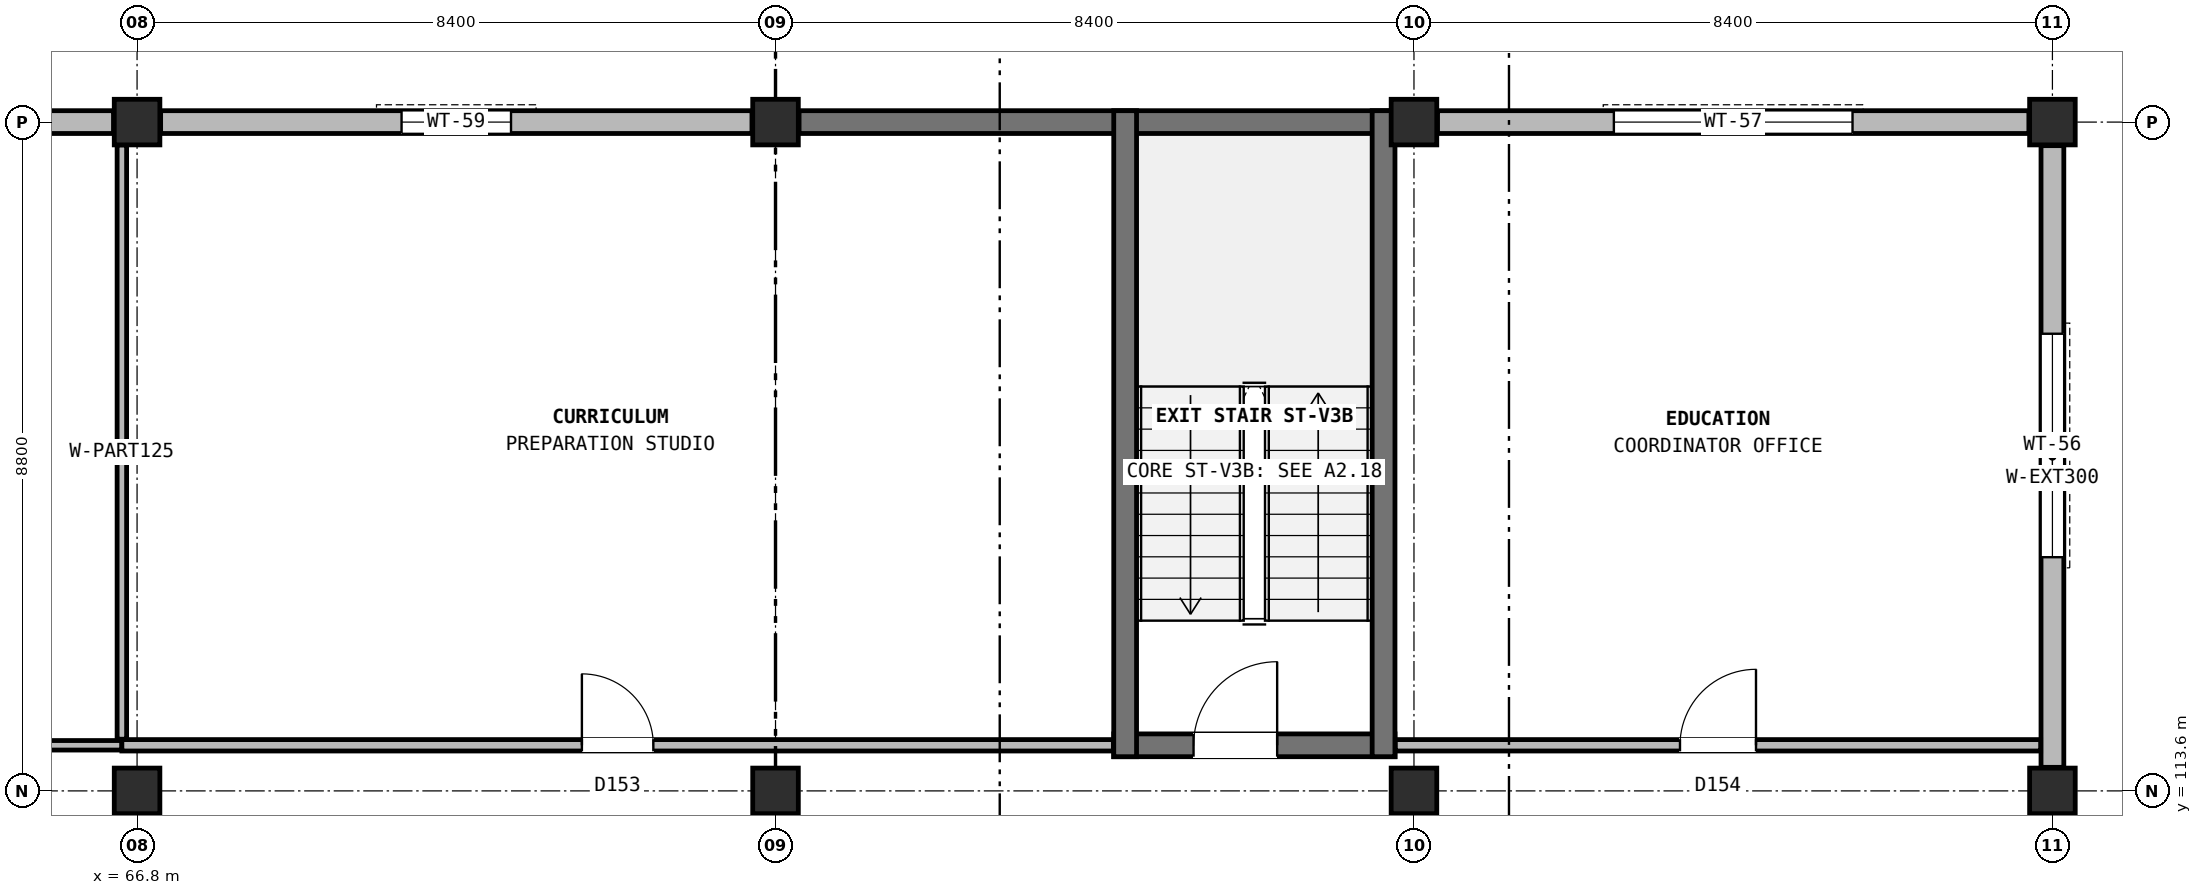
"""IFC4 building model, lengths in metres.
Left out: names, types, materials, properties, quantities, classifications, styles, units other than length and angle.
Written with IfcOpenShell. Run it as: python <this file> out.ifc"""

import sys

from ifc_helpers import new_model, si_unit, direction, frame, frame_2d, origin, origin_2d, place, context, subcontext, project, spatial, rectangle, extrude, element, fill, save


model = new_model("IFC4")
c1 = context("Model", 3, precision=1e-05, world=origin(), true_north=direction((0.0, 1.0)))
c2 = subcontext(c1, "Body", "Model", "MODEL_VIEW")
j1 = project(units=[si_unit("LENGTHUNIT", "METRE"), si_unit("PLANEANGLEUNIT", "RADIAN")], contexts=[c1])
p1 = place(None, origin())
s1 = spatial("IfcSite", under=j1, at=p1, CompositionType="ELEMENT")
p2 = place(p1, origin())
s2 = spatial("IfcBuilding", under=s1, at=p2, CompositionType="ELEMENT")
p3 = place(p2, frame((0.0, 0.0, 4.8)))
s3 = spatial("IfcBuildingStorey", under=s2, at=p3, CompositionType="ELEMENT", Elevation=4.8)
for number, where, z_axis, x_axis in (
    (1, (66.8, 113.6, 0.0), (0.0, 0.0, 1.0), (1.0, 0.0, 0.0)),
    (2, (66.8, 122.4, 0.0), (0.0, 0.0, 1.0), (1.0, 0.0, 0.0)),
    (3, (75.2, 113.6, 0.0), (0.0, 0.0, 1.0), (1.0, 0.0, 0.0)),
    (4, (75.2, 122.4, 0.0), (0.0, 0.0, 1.0), (1.0, 0.0, 0.0)),
    (5, (83.6, 113.6, 0.0), (0.0, 0.0, 1.0), (1.0, 0.0, 0.0)),
    (6, (83.6, 122.4, 0.0), (0.0, 0.0, 1.0), (1.0, 0.0, 0.0)),
    (7, (92.0, 113.6, 0.0), (0.0, 0.0, 1.0), (1.0, 0.0, 0.0)),
    (8, (92.0, 122.4, 0.0), (0.0, 0.0, 1.0), (1.0, 0.0, 0.0)),
):
    element("IfcColumn", number, at=place(p3, frame(where, z_axis=z_axis, x_axis=x_axis)), inside=s3, PredefinedType="COLUMN", context=c2, shape_type="SweptSolid", body=[
        extrude(rectangle(XDim=0.6, YDim=0.6, at=origin_2d()), origin(), (0.0, 0.0, 1.0), 4.2),
    ])
p4 = place(p3, frame((92.0, 105.11, 0.0), z_axis=(0.0, 0.0, 1.0), x_axis=(0.0, 1.0, 0.0)))
e9 = element("IfcWall", 9, at=p4, inside=s3, PredefinedType="SOLIDWALL", context=c2, shape_type="SweptSolid", body=[
    extrude(rectangle(XDim=8.18, YDim=0.3, at=frame_2d((4.09, 0.0))), origin(), (0.0, 0.0, 1.0), 3.45),
])
p5 = place(p4, frame((1.575, 0.0, 0.9)))
e10 = element("IfcOpeningElement", 10, at=p5, cuts=e9, PredefinedType="OPENING", context=c2, shape_type="SweptSolid", body=[
    extrude(rectangle(XDim=2.74, YDim=2.2, at=frame_2d((1.37, 1.1))), frame((0.0, 0.16, 0.0), z_axis=(0.0, -1.0, 0.0), x_axis=(1.0, 0.0, 0.0)), (0.0, 0.0, 1.0), 0.32),
])
p6 = place(p3, frame((92.0, 113.91, 0.0), z_axis=(0.0, 0.0, 1.0), x_axis=(0.0, 1.0, 0.0)))
e11 = element("IfcWall", 11, at=p6, inside=s3, PredefinedType="SOLIDWALL", context=c2, shape_type="SweptSolid", body=[
    extrude(rectangle(XDim=8.18, YDim=0.3, at=frame_2d((4.09, 0.0))), origin(), (0.0, 0.0, 1.0), 3.45),
])
p7 = place(p6, frame((2.765, 0.0, 0.9)))
e12 = element("IfcOpeningElement", 12, at=p7, cuts=e11, PredefinedType="OPENING", context=c2, shape_type="SweptSolid", body=[
    extrude(rectangle(XDim=2.94, YDim=2.22, at=frame_2d((1.47, 1.11))), frame((0.0, 0.16, 0.0), z_axis=(0.0, -1.0, 0.0), x_axis=(1.0, 0.0, 0.0)), (0.0, 0.0, 1.0), 0.32),
])
p8 = place(p3, frame((91.69, 122.4, 0.0), z_axis=(0.0, 0.0, 1.0), x_axis=(-1.0, 0.0, 0.0)))
e13 = element("IfcWall", 13, at=p8, inside=s3, PredefinedType="SOLIDWALL", context=c2, shape_type="SweptSolid", body=[
    extrude(rectangle(XDim=7.78, YDim=0.3, at=frame_2d((3.89, 0.0))), origin(), (0.0, 0.0, 1.0), 3.45),
])
p9 = place(p8, frame((2.32, 0.0, 0.9)))
e14 = element("IfcOpeningElement", 14, at=p9, cuts=e13, PredefinedType="OPENING", context=c2, shape_type="SweptSolid", body=[
    extrude(rectangle(XDim=3.14, YDim=2.24, at=frame_2d((1.57, 1.12))), frame((0.0, 0.16, 0.0), z_axis=(0.0, -1.0, 0.0), x_axis=(1.0, 0.0, 0.0)), (0.0, 0.0, 1.0), 0.32),
])
p10 = place(p3, frame((83.29, 122.4, 0.0), z_axis=(0.0, 0.0, 1.0), x_axis=(-1.0, 0.0, 0.0)))
e15 = element("IfcWall", 15, at=p10, inside=s3, PredefinedType="SHEAR", context=c2, shape_type="SweptSolid", body=[
    extrude(rectangle(XDim=7.78, YDim=0.3, at=frame_2d((3.89, 0.0))), origin(), (0.0, 0.0, 1.0), 3.45),
])
p11 = place(p3, frame((74.89, 122.4, 0.0), z_axis=(0.0, 0.0, 1.0), x_axis=(-1.0, 0.0, 0.0)))
e16 = element("IfcWall", 16, at=p11, inside=s3, PredefinedType="SOLIDWALL", context=c2, shape_type="SweptSolid", body=[
    extrude(rectangle(XDim=7.78, YDim=0.3, at=frame_2d((3.89, 0.0))), origin(), (0.0, 0.0, 1.0), 3.45),
])
p12 = place(p11, frame((3.17, 0.0, 0.9)))
e17 = element("IfcOpeningElement", 17, at=p12, cuts=e16, PredefinedType="OPENING", context=c2, shape_type="SweptSolid", body=[
    extrude(rectangle(XDim=1.44, YDim=2.3, at=frame_2d((0.72, 1.15))), frame((0.0, 0.16, 0.0), z_axis=(0.0, -1.0, 0.0), x_axis=(1.0, 0.0, 0.0)), (0.0, 0.0, 1.0), 0.32),
])
p13 = place(p3, frame((66.49, 122.4, 0.0), z_axis=(0.0, 0.0, 1.0), x_axis=(-1.0, 0.0, 0.0)))
e18 = element("IfcWall", 18, at=p13, inside=s3, PredefinedType="SOLIDWALL", context=c2, shape_type="SweptSolid", body=[
    extrude(rectangle(XDim=7.78, YDim=0.3, at=frame_2d((3.89, 0.0))), origin(), (0.0, 0.0, 1.0), 3.45),
])
p14 = place(p13, frame((2.97, 0.0, 0.9)))
e19 = element("IfcOpeningElement", 19, at=p14, cuts=e18, PredefinedType="OPENING", context=c2, shape_type="SweptSolid", body=[
    extrude(rectangle(XDim=1.84, YDim=2.34, at=frame_2d((0.92, 1.17))), frame((0.0, 0.16, 0.0), z_axis=(0.0, -1.0, 0.0), x_axis=(1.0, 0.0, 0.0)), (0.0, 0.0, 1.0), 0.32),
])
p15 = place(p3, frame((79.65, 114.2, 0.0), z_axis=(0.0, 0.0, 1.0), x_axis=(1.0, 0.0, 0.0)))
e20 = element("IfcWall", 20, at=p15, inside=s3, PredefinedType="SHEAR", context=c2, shape_type="SweptSolid", body=[
    extrude(rectangle(XDim=3.7, YDim=0.3, at=frame_2d((1.85, 0.0))), origin(), (0.0, 0.0, 1.0), 4.2),
])
p16 = place(p15, frame((1.05, 0.0, 0.0)))
e21 = element("IfcOpeningElement", 21, at=p16, cuts=e20, PredefinedType="OPENING", context=c2, shape_type="SweptSolid", body=[
    extrude(rectangle(XDim=1.1, YDim=2.2, at=frame_2d((0.55, 1.1))), frame((0.0, 0.16, 0.0), z_axis=(0.0, -1.0, 0.0), x_axis=(1.0, 0.0, 0.0)), (0.0, 0.0, 1.0), 0.32),
])
for number, where, z_axis, x_axis in (
    (22, (79.8, 114.05, 0.0), (0.0, 0.0, 1.0), (0.0, 1.0, 0.0)),
    (23, (83.2, 114.05, 0.0), (0.0, 0.0, 1.0), (0.0, 1.0, 0.0)),
):
    element("IfcWall", number, at=place(p3, frame(where, z_axis=z_axis, x_axis=x_axis)), inside=s3, PredefinedType="SHEAR", context=c2, shape_type="SweptSolid", body=[
        extrude(rectangle(XDim=8.5, YDim=0.3, at=frame_2d((4.25, 0.0))), origin(), (0.0, 0.0, 1.0), 4.2),
    ])
p17 = place(p3, frame((58.2, 114.2, 0.0), z_axis=(0.0, 0.0, 1.0), x_axis=(1.0, 0.0, 0.0)))
e24 = element("IfcWall", 24, at=p17, inside=s3, PredefinedType="PARTITIONING", context=c2, shape_type="SweptSolid", body=[
    extrude(rectangle(XDim=8.4, YDim=0.125, at=frame_2d((4.2, 0.0))), origin(), (0.0, 0.0, 1.0), 3.865),
])
p18 = place(p17, frame((3.71, 0.0, 0.0)))
e25 = element("IfcOpeningElement", 25, at=p18, cuts=e24, PredefinedType="OPENING", context=c2, shape_type="SweptSolid", body=[
    extrude(rectangle(XDim=0.98, YDim=2.1, at=frame_2d((0.49, 1.05))), frame((0.0, 0.073, 0.0), z_axis=(0.0, -1.0, 0.0), x_axis=(1.0, 0.0, 0.0)), (0.0, 0.0, 1.0), 0.145),
])
p19 = place(p3, frame((66.6, 114.2, 0.0), z_axis=(0.0, 0.0, 1.0), x_axis=(1.0, 0.0, 0.0)))
e26 = element("IfcWall", 26, at=p19, inside=s3, PredefinedType="PARTITIONING", context=c2, shape_type="SweptSolid", body=[
    extrude(rectangle(XDim=13.045, YDim=0.15, at=frame_2d((6.522, 0.0))), origin(), (0.0, 0.0, 1.0), 3.865),
])
p20 = place(p19, frame((6.052, 0.0, 0.0)))
e27 = element("IfcOpeningElement", 27, at=p20, cuts=e26, PredefinedType="OPENING", context=c2, shape_type="SweptSolid", body=[
    extrude(rectangle(XDim=0.94, YDim=2.12, at=frame_2d((0.47, 1.06))), frame((0.0, 0.085, 0.0), z_axis=(0.0, -1.0, 0.0), x_axis=(1.0, 0.0, 0.0)), (0.0, 0.0, 1.0), 0.17),
])
p21 = place(p3, frame((83.355, 114.2, 0.0), z_axis=(0.0, 0.0, 1.0), x_axis=(1.0, 0.0, 0.0)))
e28 = element("IfcWall", 28, at=p21, inside=s3, PredefinedType="PARTITIONING", context=c2, shape_type="SweptSolid", body=[
    extrude(rectangle(XDim=8.49, YDim=0.15, at=frame_2d((4.245, 0.0))), origin(), (0.0, 0.0, 1.0), 3.865),
])
p22 = place(p21, frame((3.745, 0.0, 0.0)))
e29 = element("IfcOpeningElement", 29, at=p22, cuts=e28, PredefinedType="OPENING", context=c2, shape_type="SweptSolid", body=[
    extrude(rectangle(XDim=1.0, YDim=2.16, at=frame_2d((0.5, 1.08))), frame((0.0, 0.085, 0.0), z_axis=(0.0, -1.0, 0.0), x_axis=(1.0, 0.0, 0.0)), (0.0, 0.0, 1.0), 0.17),
])
p23 = place(p3, frame((66.6, 114.28, 0.0), z_axis=(0.0, 0.0, 1.0), x_axis=(0.0, 1.0, 0.0)))
e30 = element("IfcWall", 30, at=p23, inside=s3, PredefinedType="PARTITIONING", context=c2, shape_type="SweptSolid", body=[
    extrude(rectangle(XDim=7.82, YDim=0.125, at=frame_2d((3.91, 0.0))), origin(), (0.0, 0.0, 1.0), 3.445),
])
p24 = place(p7, origin())
e31 = element("IfcWindow", 31, at=p24, inside=s3, PartitioningType="SINGLE_PANEL", PredefinedType="WINDOW", context=c2, shape_type="SweptSolid", body=[
    extrude(rectangle(XDim=2.94, YDim=2.22, at=frame_2d((1.47, 1.11))), frame((0.0, 0.03, 0.0), z_axis=(0.0, -1.0, 0.0), x_axis=(1.0, 0.0, 0.0)), (0.0, 0.0, 1.0), 0.06),
])
fill(e12, e31)
p25 = place(p9, origin())
e32 = element("IfcWindow", 32, at=p25, inside=s3, PartitioningType="SINGLE_PANEL", PredefinedType="WINDOW", context=c2, shape_type="SweptSolid", body=[
    extrude(rectangle(XDim=3.14, YDim=2.24, at=frame_2d((1.57, 1.12))), frame((0.0, 0.03, 0.0), z_axis=(0.0, -1.0, 0.0), x_axis=(1.0, 0.0, 0.0)), (0.0, 0.0, 1.0), 0.06),
])
fill(e14, e32)
p26 = place(p12, origin())
e33 = element("IfcWindow", 33, at=p26, inside=s3, PartitioningType="SINGLE_PANEL", PredefinedType="WINDOW", context=c2, shape_type="SweptSolid", body=[
    extrude(rectangle(XDim=1.44, YDim=2.3, at=frame_2d((0.72, 1.15))), frame((0.0, 0.03, 0.0), z_axis=(0.0, -1.0, 0.0), x_axis=(1.0, 0.0, 0.0)), (0.0, 0.0, 1.0), 0.06),
])
fill(e17, e33)
p27 = place(p16, origin())
e34 = element("IfcDoor", 34, at=p27, inside=s3, OperationType="SINGLE_SWING_RIGHT", PredefinedType="DOOR", context=c2, shape_type="SweptSolid", body=[
    extrude(rectangle(XDim=1.1, YDim=2.2, at=frame_2d((0.55, 1.1))), frame((0.0, 0.025, 0.0), z_axis=(0.0, -1.0, 0.0), x_axis=(1.0, 0.0, 0.0)), (0.0, 0.0, 1.0), 0.05),
])
fill(e21, e34)
p28 = place(p20, origin())
e35 = element("IfcDoor", 35, at=p28, inside=s3, OperationType="SINGLE_SWING_LEFT", PredefinedType="DOOR", context=c2, shape_type="SweptSolid", body=[
    extrude(rectangle(XDim=0.94, YDim=2.12, at=frame_2d((0.47, 1.06))), frame((0.0, 0.025, 0.0), z_axis=(0.0, -1.0, 0.0), x_axis=(1.0, 0.0, 0.0)), (0.0, 0.0, 1.0), 0.05),
])
fill(e27, e35)
p29 = place(p22, origin())
e36 = element("IfcDoor", 36, at=p29, inside=s3, OperationType="SINGLE_SWING_RIGHT", PredefinedType="DOOR", context=c2, shape_type="SweptSolid", body=[
    extrude(rectangle(XDim=1.0, YDim=2.16, at=frame_2d((0.5, 1.08))), frame((0.0, 0.025, 0.0), z_axis=(0.0, -1.0, 0.0), x_axis=(1.0, 0.0, 0.0)), (0.0, 0.0, 1.0), 0.05),
])
fill(e29, e36)
save(model, sys.argv[1])
